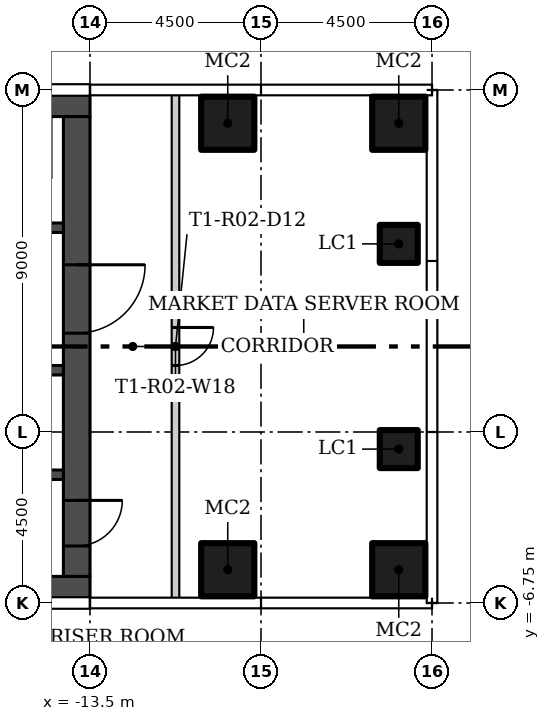
"""IFC4 building model, lengths in metres.
Left out: names, types, materials, properties, quantities, classifications, styles, units other than length and angle.
Written with IfcOpenShell. Run it as: python <this file> out.ifc"""

import sys

from ifc_helpers import new_model, si_unit, direction, frame, frame_2d, origin, origin_2d, place, context, subcontext, project, spatial, rectangle, hollow_rectangle, extrude, element, fill, save


model = new_model("IFC4")
c1 = context("Model", 3, precision=1e-05, world=origin(), true_north=direction((0.0, 1.0)))
c2 = subcontext(c1, "Body", "Model", "MODEL_VIEW")
j1 = project(units=[si_unit("LENGTHUNIT", "METRE"), si_unit("PLANEANGLEUNIT", "RADIAN")], contexts=[c1])
p1 = place(None, origin())
s1 = spatial("IfcSite", under=j1, at=p1, CompositionType="ELEMENT")
p2 = place(p1, origin())
s2 = spatial("IfcBuilding", under=s1, at=p2, CompositionType="ELEMENT")
p3 = place(p2, frame((0.0, 0.0, 33.0)))
s3 = spatial("IfcBuildingStorey", under=s2, at=p3, CompositionType="ELEMENT", Elevation=33.0)
for number, where in (
    (1, (-9.875, -5.875, 0.0)),
    (2, (-5.375, -5.875, 0.0)),
    (3, (-9.875, 5.875, 0.0)),
    (4, (-5.375, 5.875, 0.0)),
):
    element("IfcColumn", number, at=place(p3, frame(where)), inside=s3, PredefinedType="COLUMN", context=c2, shape_type="SweptSolid", body=[
        extrude(hollow_rectangle(XDim=1.4, YDim=1.4, WallThickness=0.05, at=origin_2d()), origin(), (0.0, 0.0, 1.0), 4.15),
    ])
for number, where in (
    (5, (-5.375, -2.7, 0.0)),
    (6, (-5.375, 2.7, 0.0)),
):
    element("IfcColumn", number, at=place(p3, frame(where)), inside=s3, PredefinedType="COLUMN", context=c2, shape_type="SweptSolid", body=[
        extrude(hollow_rectangle(XDim=1.0, YDim=1.0, WallThickness=0.04, at=origin_2d()), origin(), (0.0, 0.0, 1.0), 4.15),
    ])
p4 = place(p3, frame((-11.25, 6.655, 0.0), z_axis=(0.0, 0.0, 1.0), x_axis=(0.0, -1.0, 0.0)))
e7 = element("IfcWall", 7, at=p4, inside=s3, PredefinedType="PARTITIONING", context=c2, shape_type="SweptSolid", body=[
    extrude(rectangle(XDim=13.31, YDim=0.2, at=frame_2d((6.655, 0.0))), origin(), (0.0, 0.0, 1.0), 4.15),
])
p5 = place(p4, frame((6.155, 0.0, 0.0)))
e8 = element("IfcOpeningElement", 8, at=p5, cuts=e7, PredefinedType="OPENING", context=c2, shape_type="SweptSolid", body=[
    extrude(rectangle(XDim=1.0, YDim=2.1, at=frame_2d((0.5, 1.05))), frame((0.0, 0.11, 0.0), z_axis=(0.0, -1.0, 0.0), x_axis=(1.0, 0.0, 0.0)), (0.0, 0.0, 1.0), 0.22),
])
for number, where in (
    (9, (-27.0, -6.4, 0.0)),
    (10, (-27.0, 6.4, 0.0)),
):
    element("IfcWall", number, at=place(p3, frame(where)), inside=s3, PredefinedType="SHEAR", context=c2, shape_type="SweptSolid", body=[
        extrude(rectangle(XDim=13.5, YDim=0.7, at=frame_2d((6.75, 0.0))), origin(), (0.0, 0.0, 1.0), 4.15),
    ])
p6 = place(p3, frame((-13.85, 6.05, 0.0), z_axis=(0.0, 0.0, 1.0), x_axis=(0.0, -1.0, 0.0)))
e11 = element("IfcWall", 11, at=p6, inside=s3, PredefinedType="SHEAR", context=c2, shape_type="SweptSolid", body=[
    extrude(rectangle(XDim=12.1, YDim=0.7, at=frame_2d((6.05, 0.0))), origin(), (0.0, 0.0, 1.0), 4.15),
])
p7 = place(p6, frame((10.1, 0.0, 0.0)))
e12 = element("IfcOpeningElement", 12, at=p7, cuts=e11, PredefinedType="OPENING", context=c2, shape_type="SweptSolid", body=[
    extrude(rectangle(XDim=1.2, YDim=2.1, at=frame_2d((0.6, 1.05))), frame((0.0, 0.36, 0.0), z_axis=(0.0, -1.0, 0.0), x_axis=(1.0, 0.0, 0.0)), (0.0, 0.0, 1.0), 0.72),
])
p8 = place(p6, frame((3.9, 0.0, 0.0)))
e13 = element("IfcOpeningElement", 13, at=p8, cuts=e11, PredefinedType="OPENING", context=c2, shape_type="SweptSolid", body=[
    extrude(rectangle(XDim=1.8, YDim=2.4, at=frame_2d((0.9, 1.2))), frame((0.0, 0.36, 0.0), z_axis=(0.0, -1.0, 0.0), x_axis=(1.0, 0.0, 0.0)), (0.0, 0.0, 1.0), 0.72),
])
p9 = place(p3, frame((-14.2, -3.375, 0.0), z_axis=(0.0, 0.0, 1.0), x_axis=(-1.0, 0.0, 0.0)))
e14 = element("IfcWall", 14, at=p9, inside=s3, PredefinedType="SHEAR", context=c2, shape_type="SweptSolid", body=[
    extrude(rectangle(XDim=12.1, YDim=0.25, at=frame_2d((6.05, 0.0))), origin(), (0.0, 0.0, 1.0), 4.15),
])
p10 = place(p9, frame((10.95, 0.0, 0.0)))
e15 = element("IfcOpeningElement", 15, at=p10, cuts=e14, PredefinedType="OPENING", context=c2, shape_type="SweptSolid", body=[
    extrude(rectangle(XDim=1.1, YDim=2.1, at=frame_2d((0.55, 1.05))), frame((0.0, 0.135, 0.0), z_axis=(0.0, -1.0, 0.0), x_axis=(1.0, 0.0, 0.0)), (0.0, 0.0, 1.0), 0.27),
])
p11 = place(p3, frame((-14.2, -0.625, 0.0), z_axis=(0.0, 0.0, 1.0), x_axis=(-1.0, 0.0, 0.0)))
e16 = element("IfcWall", 16, at=p11, inside=s3, PredefinedType="SHEAR", context=c2, shape_type="SweptSolid", body=[
    extrude(rectangle(XDim=12.1, YDim=0.25, at=frame_2d((6.05, 0.0))), origin(), (0.0, 0.0, 1.0), 4.15),
])
p12 = place(p11, frame((8.65, 0.0, 0.0)))
e17 = element("IfcOpeningElement", 17, at=p12, cuts=e16, PredefinedType="OPENING", context=c2, shape_type="SweptSolid", body=[
    extrude(rectangle(XDim=1.2, YDim=2.1, at=frame_2d((0.6, 1.05))), frame((0.0, 0.135, 0.0), z_axis=(0.0, -1.0, 0.0), x_axis=(1.0, 0.0, 0.0)), (0.0, 0.0, 1.0), 0.27),
])
p13 = place(p11, frame((1.175, 0.0, 0.0)))
e18 = element("IfcOpeningElement", 18, at=p13, cuts=e16, PredefinedType="OPENING", context=c2, shape_type="SweptSolid", body=[
    extrude(rectangle(XDim=0.9, YDim=2.1, at=frame_2d((0.45, 1.05))), frame((0.0, 0.135, 0.0), z_axis=(0.0, -1.0, 0.0), x_axis=(1.0, 0.0, 0.0)), (0.0, 0.0, 1.0), 0.27),
])
p14 = place(p3, frame((-26.3, 3.125, 0.0)))
e19 = element("IfcWall", 19, at=p14, inside=s3, PredefinedType="SHEAR", context=c2, shape_type="SweptSolid", body=[
    extrude(rectangle(XDim=12.1, YDim=0.25, at=frame_2d((6.05, 0.0))), origin(), (0.0, 0.0, 1.0), 4.15),
])
p15 = place(p14, frame((0.85, 0.0, 0.0)))
e20 = element("IfcOpeningElement", 20, at=p15, cuts=e19, PredefinedType="OPENING", context=c2, shape_type="SweptSolid", body=[
    extrude(rectangle(XDim=1.1, YDim=2.1, at=frame_2d((0.55, 1.05))), frame((0.0, 0.135, 0.0), z_axis=(0.0, -1.0, 0.0), x_axis=(1.0, 0.0, 0.0)), (0.0, 0.0, 1.0), 0.27),
])
p16 = place(p14, frame((3.9, 0.0, 0.0)))
e21 = element("IfcOpeningElement", 21, at=p16, cuts=e19, PredefinedType="OPENING", context=c2, shape_type="SweptSolid", body=[
    extrude(rectangle(XDim=1.1, YDim=2.1, at=frame_2d((0.55, 1.05))), frame((0.0, 0.135, 0.0), z_axis=(0.0, -1.0, 0.0), x_axis=(1.0, 0.0, 0.0)), (0.0, 0.0, 1.0), 0.27),
])
p17 = place(p5, origin())
e22 = element("IfcDoor", 22, at=p17, inside=s3, OperationType="SINGLE_SWING_RIGHT", PredefinedType="DOOR", context=c2, shape_type="SweptSolid", body=[
    extrude(rectangle(XDim=1.0, YDim=2.1, at=frame_2d((0.5, 1.05))), frame((0.0, 0.025, 0.0), z_axis=(0.0, -1.0, 0.0), x_axis=(1.0, 0.0, 0.0)), (0.0, 0.0, 1.0), 0.05),
])
fill(e8, e22)
p18 = place(p7, origin())
e23 = element("IfcDoor", 23, at=p18, inside=s3, OperationType="SINGLE_SWING_RIGHT", PredefinedType="DOOR", context=c2, shape_type="SweptSolid", body=[
    extrude(rectangle(XDim=1.2, YDim=2.1, at=frame_2d((0.6, 1.05))), frame((0.0, 0.025, 0.0), z_axis=(0.0, -1.0, 0.0), x_axis=(1.0, 0.0, 0.0)), (0.0, 0.0, 1.0), 0.05),
])
fill(e12, e23)
p19 = place(p8, origin())
e24 = element("IfcDoor", 24, at=p19, inside=s3, OperationType="DOUBLE_DOOR_SINGLE_SWING", PredefinedType="DOOR", context=c2, shape_type="SweptSolid", body=[
    extrude(rectangle(XDim=1.8, YDim=2.4, at=frame_2d((0.9, 1.2))), frame((0.0, 0.025, 0.0), z_axis=(0.0, -1.0, 0.0), x_axis=(1.0, 0.0, 0.0)), (0.0, 0.0, 1.0), 0.05),
])
fill(e13, e24)
save(model, sys.argv[1])
